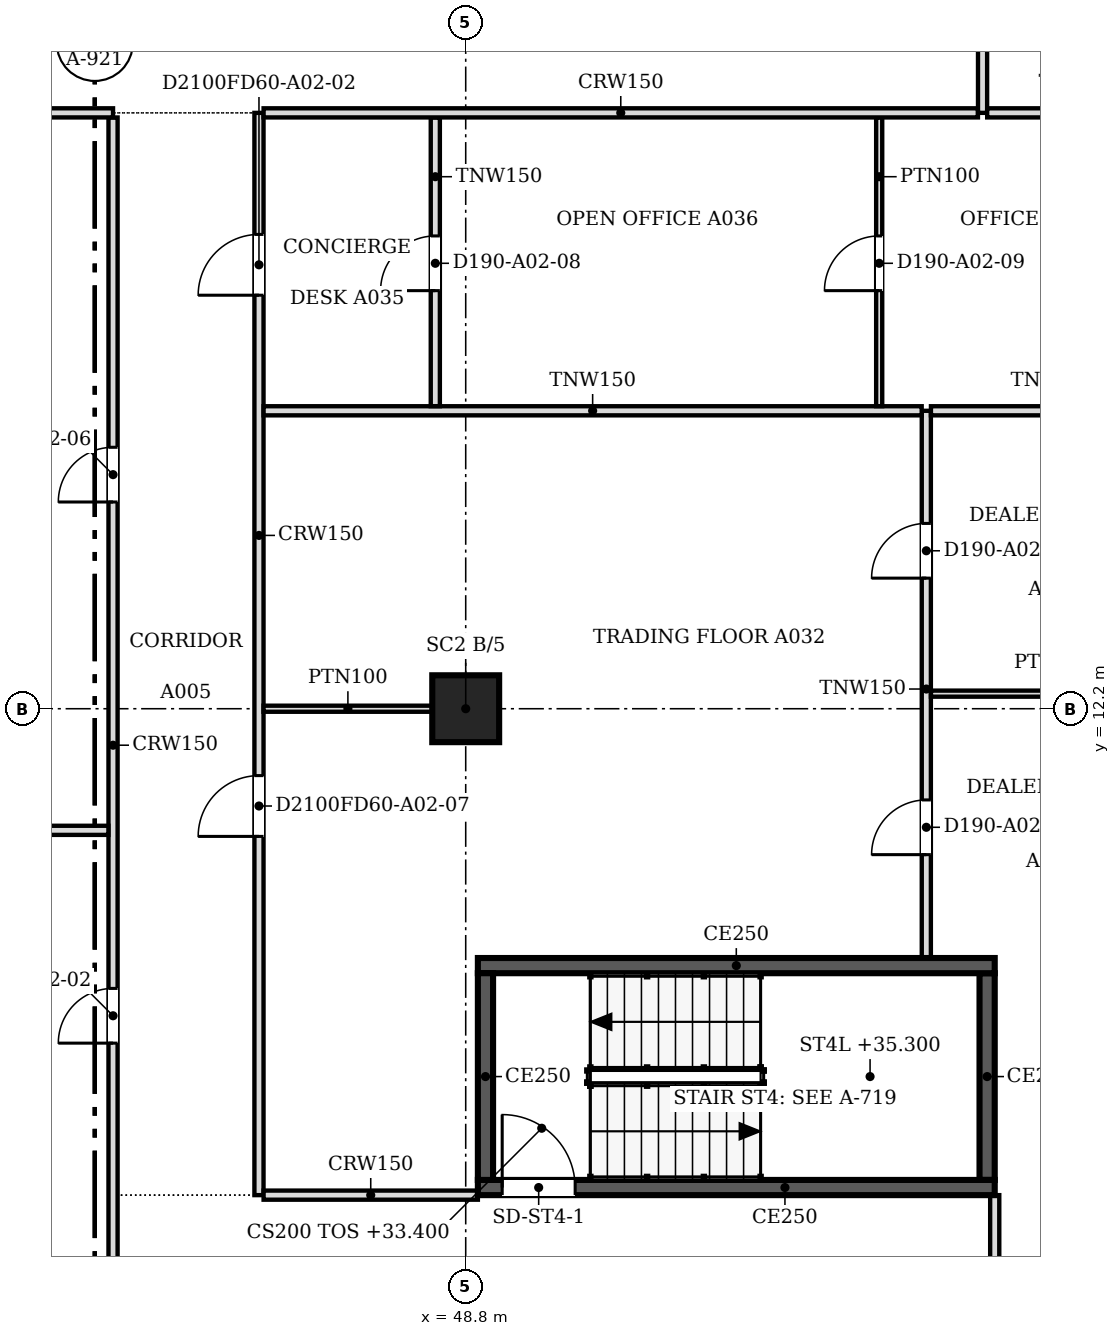
"""IFC4 building model, lengths in metres.
Left out: names, types, materials, properties, quantities, classifications, styles, units other than length and angle.
Written with IfcOpenShell. Run it as: python <this file> out.ifc"""

import sys

from ifc_helpers import new_model, si_unit, direction, frame, frame_2d, origin, origin_2d, place, context, subcontext, project, spatial, polyline, rectangle, outline, extrude, faceted_brep, source, transform, mapped, element, fill, save


model = new_model("IFC4")
c1 = context("Model", 3, precision=1e-05, world=origin(), true_north=direction((0.0, 1.0)))
c2 = subcontext(c1, "Body", "Model", "MODEL_VIEW")
j1 = project(units=[si_unit("LENGTHUNIT", "METRE"), si_unit("PLANEANGLEUNIT", "RADIAN")], contexts=[c1])
p1 = place(None, origin())
s1 = spatial("IfcSite", under=j1, at=p1, CompositionType="ELEMENT")
p2 = place(p1, origin())
s2 = spatial("IfcBuilding", under=s1, at=p2, CompositionType="ELEMENT")
p3 = place(p2, frame((0.0, 0.0, 33.4)))
s3 = spatial("IfcBuildingStorey", under=s2, at=p3, CompositionType="ELEMENT", Elevation=33.4)
p4 = place(p3, frame((48.8, 12.2, 0.0), z_axis=(0.0, 0.0, 1.0), x_axis=(1.0, 0.0, 0.0)))
e1 = element("IfcColumn", 1, at=p4, inside=s3, PredefinedType="COLUMN", context=c2, shape_type="SweptSolid", body=[
    extrude(rectangle(XDim=1.1, YDim=1.1, at=origin_2d()), origin(), (0.0, 0.0, 1.0), 3.6),
])
m1 = source(origin(), c2, "Body", "Brep", [
    faceted_brep([(2.944, -0.25, 0.0), (2.997, -0.25, 0.068), (2.997, -0.25, 7.532), (2.944, -0.25, 7.6), (0.0, -0.25, 3.8), (0.053, 0.25, 3.868), (2.891, 0.25, 7.532), (2.891, 0.25, 0.068), (0.053, 0.25, 3.731), (2.944, 0.0, 0.0), (2.944, 0.0, 7.6), (0.0, 0.0, 3.8)], [[[0, 1, 2, 3, 4]], [[5, 6, 7, 8]], [[1, 0, 9]], [[10, 3, 2]], [[6, 5, 11, 4, 3, 10]], [[8, 7, 9, 0, 4, 11]], [[8, 11, 5]], [[1, 9, 7, 6, 10, 2]]]),
])
p5 = place(p3, frame((57.606, 1.312, -3.8), z_axis=(0.0, 0.0, 1.0), x_axis=(0.707147509625, 0.707066050402, 0.0)))
e2 = element("IfcWall", 2, at=p5, inside=s3, PredefinedType="SOLIDWALL", context=c2, shape_type="MappedRepresentation", body=[
    mapped(m1, transform((0.0, 0.0, 0.0), scale=1.0)),
])
m2 = source(origin(), c2, "Body", "SweptSolid", [
    extrude(outline(polyline([(2.744, 6.934), (0.316, 3.8), (2.744, 0.666), (2.744, 6.934)])), frame((0.0, 0.26, 0.0), z_axis=(0.0, -1.0, 0.0), x_axis=(1.0, 0.0, 0.0)), (0.0, 0.0, 1.0), 0.52),
])
p6 = place(p5, origin())
e3 = element("IfcOpeningElement", 3, at=p6, cuts=e2, PredefinedType="OPENING", context=c2, shape_type="MappedRepresentation", body=[
    mapped(m2, transform((0.0, 0.0, 0.0), scale=1.0)),
])
p7 = place(p2, frame((0.0, 0.0, 37.2)))
s4 = spatial("IfcBuildingStorey", under=s2, at=p7, CompositionType="ELEMENT", Elevation=37.2)
m3 = source(origin(), c2, "Body", "Brep", [
    faceted_brep([(0.053, -0.25, 0.0), (2.997, -0.25, 3.8), (0.053, -0.25, 7.6), (0.0, -0.25, 7.532), (0.0, -0.25, 0.068), (0.106, 0.25, 7.532), (2.944, 0.25, 3.868), (2.944, 0.25, 3.732), (0.106, 0.25, 0.068), (2.997, 0.0, 3.8), (0.053, 0.0, 0.0), (0.053, 0.0, 7.6)], [[[0, 1, 2, 3, 4]], [[5, 6, 7, 8]], [[8, 7, 9, 1, 0, 10]], [[6, 5, 11, 2, 1, 9]], [[3, 2, 11]], [[10, 0, 4]], [[8, 10, 4, 3, 11, 5]], [[9, 7, 6]]]),
])
p8 = place(p7, frame((57.569, 1.274, -3.8), z_axis=(0.0, 0.0, 1.0), x_axis=(0.707066050402, 0.707147509625, 0.0)))
e4 = element("IfcWall", 4, at=p8, inside=s4, PredefinedType="SOLIDWALL", context=c2, shape_type="MappedRepresentation", body=[
    mapped(m3, transform((0.0, 0.0, 0.0), scale=1.0)),
])
m4 = source(origin(), c2, "Body", "SweptSolid", [
    extrude(outline(polyline([(0.253, 0.667), (2.681, 3.8), (0.253, 6.934), (0.253, 0.667)])), frame((0.0, 0.26, 0.0), z_axis=(0.0, -1.0, 0.0), x_axis=(1.0, 0.0, 0.0)), (0.0, 0.0, 1.0), 0.52),
])
p9 = place(p8, origin())
e5 = element("IfcOpeningElement", 5, at=p9, cuts=e4, PredefinedType="OPENING", context=c2, shape_type="MappedRepresentation", body=[
    mapped(m4, transform((0.0, 0.0, 0.0), scale=1.0)),
])
p10 = place(p3, frame((57.5, 4.325, 0.0), z_axis=(0.0, 0.0, 1.0), x_axis=(-1.0, 0.0, 0.0)))
e6 = element("IfcWall", 6, at=p10, inside=s3, PredefinedType="SOLIDWALL", context=c2, shape_type="SweptSolid", body=[
    extrude(rectangle(XDim=8.5, YDim=0.25, at=frame_2d((4.25, 0.0))), origin(), (0.0, 0.0, 1.0), 3.8),
])
m5 = source(origin(), c2, "Body", "SweptSolid", [
    extrude(rectangle(XDim=1.2, YDim=2.1, at=frame_2d((0.6, 1.05))), frame((0.0, 0.135, 0.0), z_axis=(0.0, -1.0, 0.0), x_axis=(1.0, 0.0, 0.0)), (0.0, 0.0, 1.0), 0.27),
])
p11 = place(p10, frame((6.9, 0.0, 0.0)))
e7 = element("IfcOpeningElement", 7, at=p11, cuts=e6, PredefinedType="OPENING", context=c2, shape_type="MappedRepresentation", body=[
    mapped(m5, transform((0.0, 0.0, 0.0), scale=1.0)),
])
p12 = place(p3, frame((49.125, 4.45, 0.0), z_axis=(0.0, 0.0, 1.0), x_axis=(0.0, 1.0, 0.0)))
e8 = element("IfcWall", 8, at=p12, inside=s3, PredefinedType="SOLIDWALL", context=c2, shape_type="SweptSolid", body=[
    extrude(rectangle(XDim=3.4, YDim=0.25, at=frame_2d((1.7, 0.0))), origin(), (0.0, 0.0, 1.0), 3.8),
])
p13 = place(p3, frame((49.0, 7.975, 0.0), z_axis=(0.0, 0.0, 1.0), x_axis=(1.0, 0.0, 0.0)))
e9 = element("IfcWall", 9, at=p13, inside=s3, PredefinedType="SOLIDWALL", context=c2, shape_type="SweptSolid", body=[
    extrude(rectangle(XDim=8.5, YDim=0.25, at=frame_2d((4.25, 0.0))), origin(), (0.0, 0.0, 1.0), 3.8),
])
p14 = place(p3, frame((57.375, 7.85, 0.0), z_axis=(0.0, 0.0, 1.0), x_axis=(0.0, -1.0, 0.0)))
e10 = element("IfcWall", 10, at=p14, inside=s3, PredefinedType="SOLIDWALL", context=c2, shape_type="SweptSolid", body=[
    extrude(rectangle(XDim=3.4, YDim=0.25, at=frame_2d((1.7, 0.0))), origin(), (0.0, 0.0, 1.0), 3.8),
])
p15 = place(p3, frame((43.0, 0.5, 0.0), z_axis=(0.0, 0.0, 1.0), x_axis=(0.0, 1.0, 0.0)))
e11 = element("IfcWall", 11, at=p15, inside=s3, PredefinedType="PARTITIONING", context=c2, shape_type="SweptSolid", body=[
    extrude(rectangle(XDim=21.424, YDim=0.15, at=frame_2d((10.712, 0.0))), origin(), (0.0, 0.0, 1.0), 3.067),
])
m6 = source(origin(), c2, "Body", "SweptSolid", [
    extrude(rectangle(XDim=0.9, YDim=2.1, at=frame_2d((0.45, 1.05))), frame((0.0, 0.085, 0.0), z_axis=(0.0, -1.0, 0.0), x_axis=(1.0, 0.0, 0.0)), (0.0, 0.0, 1.0), 0.17),
])
p16 = place(p15, frame((6.2, 0.0, 0.0)))
e12 = element("IfcOpeningElement", 12, at=p16, cuts=e11, PredefinedType="OPENING", context=c2, shape_type="MappedRepresentation", body=[
    mapped(m6, transform((0.0, 0.0, 0.0), scale=1.0)),
])
p17 = place(p15, frame((15.1, 0.0, 0.0)))
e13 = element("IfcOpeningElement", 13, at=p17, cuts=e11, PredefinedType="OPENING", context=c2, shape_type="MappedRepresentation", body=[
    mapped(m6, transform((0.0, 0.0, 0.0), scale=1.0)),
])
p18 = place(p3, frame((57.5, 1.559, 0.0), z_axis=(0.0, 0.0, 1.0), x_axis=(0.0, 1.0, 0.0)))
e14 = element("IfcWall", 14, at=p18, inside=s3, PredefinedType="PARTITIONING", context=c2, shape_type="SweptSolid", body=[
    extrude(rectangle(XDim=2.641, YDim=0.15, at=frame_2d((1.32, 0.0))), origin(), (0.0, 0.0, 1.0), 3.067),
])
p19 = place(p3, frame((45.4, 22.0, 0.0), z_axis=(0.0, 0.0, 1.0), x_axis=(0.0, -1.0, 0.0)))
e15 = element("IfcWall", 15, at=p19, inside=s3, PredefinedType="PARTITIONING", context=c2, shape_type="SweptSolid", body=[
    extrude(rectangle(XDim=17.8, YDim=0.15, at=frame_2d((8.9, 0.0))), origin(), (0.0, 0.0, 1.0), 3.067),
])
m7 = source(origin(), c2, "Body", "SweptSolid", [
    extrude(rectangle(XDim=1.0, YDim=2.1, at=frame_2d((0.5, 1.05))), frame((0.0, 0.085, 0.0), z_axis=(0.0, -1.0, 0.0), x_axis=(1.0, 0.0, 0.0)), (0.0, 0.0, 1.0), 0.17),
])
p20 = place(p19, frame((1.999, 0.0, 0.0)))
e16 = element("IfcOpeningElement", 16, at=p20, cuts=e15, PredefinedType="OPENING", context=c2, shape_type="MappedRepresentation", body=[
    mapped(m7, transform((0.0, 0.0, 0.0), scale=1.0)),
])
p21 = place(p19, frame((10.9, 0.0, 0.0)))
e17 = element("IfcOpeningElement", 17, at=p21, cuts=e15, PredefinedType="OPENING", context=c2, shape_type="MappedRepresentation", body=[
    mapped(m7, transform((0.0, 0.0, 0.0), scale=1.0)),
])
p22 = place(p3, frame((45.476, 4.2, 0.0), z_axis=(0.0, 0.0, 1.0), x_axis=(1.0, 0.0, 0.0)))
e18 = element("IfcWall", 18, at=p22, inside=s3, PredefinedType="PARTITIONING", context=c2, shape_type="SweptSolid", body=[
    extrude(rectangle(XDim=3.524, YDim=0.15, at=frame_2d((1.762, 0.0))), origin(), (0.0, 0.0, 1.0), 3.067),
])
p23 = place(p3, frame((56.375, 17.1, 0.0), z_axis=(0.0, 0.0, 1.0), x_axis=(0.0, -1.0, 0.0)))
e19 = element("IfcWall", 19, at=p23, inside=s3, PredefinedType="PARTITIONING", context=c2, shape_type="SweptSolid", body=[
    extrude(rectangle(XDim=9.0, YDim=0.15, at=frame_2d((4.5, 0.0))), origin(), (0.0, 0.0, 1.0), 3.067),
])
p24 = place(p23, frame((6.4, 0.0, 0.0)))
e20 = element("IfcOpeningElement", 20, at=p24, cuts=e19, PredefinedType="OPENING", context=c2, shape_type="MappedRepresentation", body=[
    mapped(m6, transform((0.0, 0.0, 0.0), scale=1.0)),
])
p25 = place(p23, frame((1.852, 0.0, 0.0)))
e21 = element("IfcOpeningElement", 21, at=p25, cuts=e19, PredefinedType="OPENING", context=c2, shape_type="MappedRepresentation", body=[
    mapped(m6, transform((0.0, 0.0, 0.0), scale=1.0)),
])
p26 = place(p3, frame((27.075, 10.2, 0.0), z_axis=(0.0, 0.0, 1.0), x_axis=(1.0, 0.0, 0.0)))
e22 = element("IfcWall", 22, at=p26, inside=s3, PredefinedType="PARTITIONING", context=c2, shape_type="SweptSolid", body=[
    extrude(rectangle(XDim=15.849, YDim=0.15, at=frame_2d((7.925, 0.0))), origin(), (0.0, 0.0, 1.0), 3.067),
])
p27 = place(p3, frame((48.25, 12.2, 0.0), z_axis=(0.0, 0.0, 1.0), x_axis=(-1.0, 0.0, 0.0)))
e23 = element("IfcWall", 23, at=p27, inside=s3, PredefinedType="PARTITIONING", context=c2, shape_type="SweptSolid", body=[
    extrude(rectangle(XDim=2.775, YDim=0.1, at=frame_2d((1.387, 0.0))), origin(), (0.0, 0.0, 1.0), 3.067),
])
p28 = place(p3, frame((56.451, 12.448, 0.0), z_axis=(0.0, 0.0, 1.0), x_axis=(1.0, 0.0, 0.0)))
e24 = element("IfcWall", 24, at=p28, inside=s3, PredefinedType="PARTITIONING", context=c2, shape_type="SweptSolid", body=[
    extrude(rectangle(XDim=4.049, YDim=0.1, at=frame_2d((2.024, 0.0))), origin(), (0.0, 0.0, 1.0), 3.067),
])
p29 = place(p3, frame((45.476, 17.1, 0.0), z_axis=(0.0, 0.0, 1.0), x_axis=(1.0, 0.0, 0.0)))
e25 = element("IfcWall", 25, at=p29, inside=s3, PredefinedType="PARTITIONING", context=c2, shape_type="SweptSolid", body=[
    extrude(rectangle(XDim=10.823, YDim=0.15, at=frame_2d((5.412, 0.0))), origin(), (0.0, 0.0, 1.0), 3.067),
])
p30 = place(p3, frame((56.451, 17.1, 0.0), z_axis=(0.0, 0.0, 1.0), x_axis=(1.0, 0.0, 0.0)))
e26 = element("IfcWall", 26, at=p30, inside=s3, PredefinedType="PARTITIONING", context=c2, shape_type="SweptSolid", body=[
    extrude(rectangle(XDim=4.049, YDim=0.15, at=frame_2d((2.024, 0.0))), origin(), (0.0, 0.0, 1.0), 3.067),
])
p31 = place(p3, frame((48.3, 21.924, 0.0), z_axis=(0.0, 0.0, 1.0), x_axis=(0.0, -1.0, 0.0)))
e27 = element("IfcWall", 27, at=p31, inside=s3, PredefinedType="PARTITIONING", context=c2, shape_type="SweptSolid", body=[
    extrude(rectangle(XDim=4.748, YDim=0.15, at=frame_2d((2.374, 0.0))), origin(), (0.0, 0.0, 1.0), 3.067),
])
p32 = place(p31, frame((1.948, 0.0, 0.0)))
e28 = element("IfcOpeningElement", 28, at=p32, cuts=e27, PredefinedType="OPENING", context=c2, shape_type="MappedRepresentation", body=[
    mapped(m6, transform((0.0, 0.0, 0.0), scale=1.0)),
])
p33 = place(p3, frame((55.6, 21.924, 0.0), z_axis=(0.0, 0.0, 1.0), x_axis=(0.0, -1.0, 0.0)))
e29 = element("IfcWall", 29, at=p33, inside=s3, PredefinedType="PARTITIONING", context=c2, shape_type="SweptSolid", body=[
    extrude(rectangle(XDim=4.748, YDim=0.1, at=frame_2d((2.374, 0.0))), origin(), (0.0, 0.0, 1.0), 3.067),
])
m8 = source(origin(), c2, "Body", "SweptSolid", [
    extrude(rectangle(XDim=0.9, YDim=2.1, at=frame_2d((0.45, 1.05))), frame((0.0, 0.06, 0.0), z_axis=(0.0, -1.0, 0.0), x_axis=(1.0, 0.0, 0.0)), (0.0, 0.0, 1.0), 0.12),
])
p34 = place(p33, frame((1.948, 0.0, 0.0)))
e30 = element("IfcOpeningElement", 30, at=p34, cuts=e29, PredefinedType="OPENING", context=c2, shape_type="MappedRepresentation", body=[
    mapped(m8, transform((0.0, 0.0, 0.0), scale=1.0)),
])
p35 = place(p3, frame((30.5, 22.0, 0.0), z_axis=(0.0, 0.0, 1.0), x_axis=(1.0, 0.0, 0.0)))
e31 = element("IfcWall", 31, at=p35, inside=s3, PredefinedType="PARTITIONING", context=c2, shape_type="SweptSolid", body=[
    extrude(rectangle(XDim=12.5, YDim=0.15, at=frame_2d((6.25, 0.0))), origin(), (0.0, 0.0, 1.0), 3.067),
])
p36 = place(p3, frame((45.476, 22.0, 0.0), z_axis=(0.0, 0.0, 1.0), x_axis=(1.0, 0.0, 0.0)))
e32 = element("IfcWall", 32, at=p36, inside=s3, PredefinedType="PARTITIONING", context=c2, shape_type="SweptSolid", body=[
    extrude(rectangle(XDim=11.748, YDim=0.15, at=frame_2d((5.874, 0.0))), origin(), (0.0, 0.0, 1.0), 3.067),
])
p37 = place(p3, frame((57.3, 30.6, 0.0), z_axis=(0.0, 0.0, 1.0), x_axis=(0.0, -1.0, 0.0)))
e33 = element("IfcWall", 33, at=p37, inside=s3, PredefinedType="PARTITIONING", context=c2, shape_type="SweptSolid", body=[
    extrude(rectangle(XDim=8.6, YDim=0.15, at=frame_2d((4.3, 0.0))), origin(), (0.0, 0.0, 1.0), 3.067),
])
p38 = place(p37, frame((3.9, 0.0, 0.0)))
e34 = element("IfcOpeningElement", 34, at=p38, cuts=e33, PredefinedType="OPENING", context=c2, shape_type="MappedRepresentation", body=[
    mapped(m6, transform((0.0, 0.0, 0.0), scale=1.0)),
])
p39 = place(p3, frame((57.376, 22.0, 0.0), z_axis=(0.0, 0.0, 1.0), x_axis=(1.0, 0.0, 0.0)))
e35 = element("IfcWall", 35, at=p39, inside=s3, PredefinedType="PARTITIONING", context=c2, shape_type="SweptSolid", body=[
    extrude(rectangle(XDim=3.124, YDim=0.15, at=frame_2d((1.562, 0.0))), origin(), (0.0, 0.0, 1.0), 3.067),
])
m9 = source(origin(), c2, "Body", "SweptSolid", [
    extrude(rectangle(XDim=1.2, YDim=2.1, at=frame_2d((0.6, 1.05))), frame((0.0, 0.025, 0.0), z_axis=(0.0, -1.0, 0.0), x_axis=(1.0, 0.0, 0.0)), (0.0, 0.0, 1.0), 0.05),
])
p40 = place(p11, origin())
e36 = element("IfcDoor", 36, at=p40, inside=s3, OperationType="SINGLE_SWING_RIGHT", PredefinedType="DOOR", context=c2, shape_type="MappedRepresentation", body=[
    mapped(m9, transform((0.0, 0.0, 0.0), scale=1.0)),
])
fill(e7, e36)
m10 = source(origin(), c2, "Body", "SweptSolid", [
    extrude(rectangle(XDim=0.9, YDim=2.1, at=frame_2d((0.45, 1.05))), frame((0.0, 0.025, 0.0), z_axis=(0.0, -1.0, 0.0), x_axis=(1.0, 0.0, 0.0)), (0.0, 0.0, 1.0), 0.05),
])
p41 = place(p24, origin())
e37 = element("IfcDoor", 37, at=p41, inside=s3, OperationType="SINGLE_SWING_RIGHT", PredefinedType="DOOR", context=c2, shape_type="MappedRepresentation", body=[
    mapped(m10, transform((0.0, 0.0, 0.0), scale=1.0)),
])
fill(e20, e37)
p42 = place(p25, origin())
e38 = element("IfcDoor", 38, at=p42, inside=s3, OperationType="SINGLE_SWING_RIGHT", PredefinedType="DOOR", context=c2, shape_type="MappedRepresentation", body=[
    mapped(m10, transform((0.0, 0.0, 0.0), scale=1.0)),
])
fill(e21, e38)
p43 = place(p32, origin())
e39 = element("IfcDoor", 39, at=p43, inside=s3, OperationType="SINGLE_SWING_RIGHT", PredefinedType="DOOR", context=c2, shape_type="MappedRepresentation", body=[
    mapped(m10, transform((0.0, 0.0, 0.0), scale=1.0)),
])
fill(e28, e39)
p44 = place(p34, origin())
e40 = element("IfcDoor", 40, at=p44, inside=s3, OperationType="SINGLE_SWING_RIGHT", PredefinedType="DOOR", context=c2, shape_type="MappedRepresentation", body=[
    mapped(m10, transform((0.0, 0.0, 0.0), scale=1.0)),
])
fill(e30, e40)
m11 = source(origin(), c2, "Body", "SweptSolid", [
    extrude(rectangle(XDim=1.0, YDim=2.1, at=frame_2d((0.5, 1.05))), frame((0.0, 0.025, 0.0), z_axis=(0.0, -1.0, 0.0), x_axis=(1.0, 0.0, 0.0)), (0.0, 0.0, 1.0), 0.05),
])
p45 = place(p20, origin())
e41 = element("IfcDoor", 41, at=p45, inside=s3, OperationType="SINGLE_SWING_RIGHT", PredefinedType="DOOR", context=c2, shape_type="MappedRepresentation", body=[
    mapped(m11, transform((0.0, 0.0, 0.0), scale=1.0)),
])
fill(e16, e41)
p46 = place(p16, origin())
e42 = element("IfcDoor", 42, at=p46, inside=s3, OperationType="SINGLE_SWING_LEFT", PredefinedType="DOOR", context=c2, shape_type="MappedRepresentation", body=[
    mapped(m10, transform((0.0, 0.0, 0.0), scale=1.0)),
])
fill(e12, e42)
p47 = place(p17, origin())
e43 = element("IfcDoor", 43, at=p47, inside=s3, OperationType="SINGLE_SWING_LEFT", PredefinedType="DOOR", context=c2, shape_type="MappedRepresentation", body=[
    mapped(m10, transform((0.0, 0.0, 0.0), scale=1.0)),
])
fill(e13, e43)
p48 = place(p21, origin())
e44 = element("IfcDoor", 44, at=p48, inside=s3, OperationType="SINGLE_SWING_RIGHT", PredefinedType="DOOR", context=c2, shape_type="MappedRepresentation", body=[
    mapped(m11, transform((0.0, 0.0, 0.0), scale=1.0)),
])
fill(e17, e44)
save(model, sys.argv[1])
